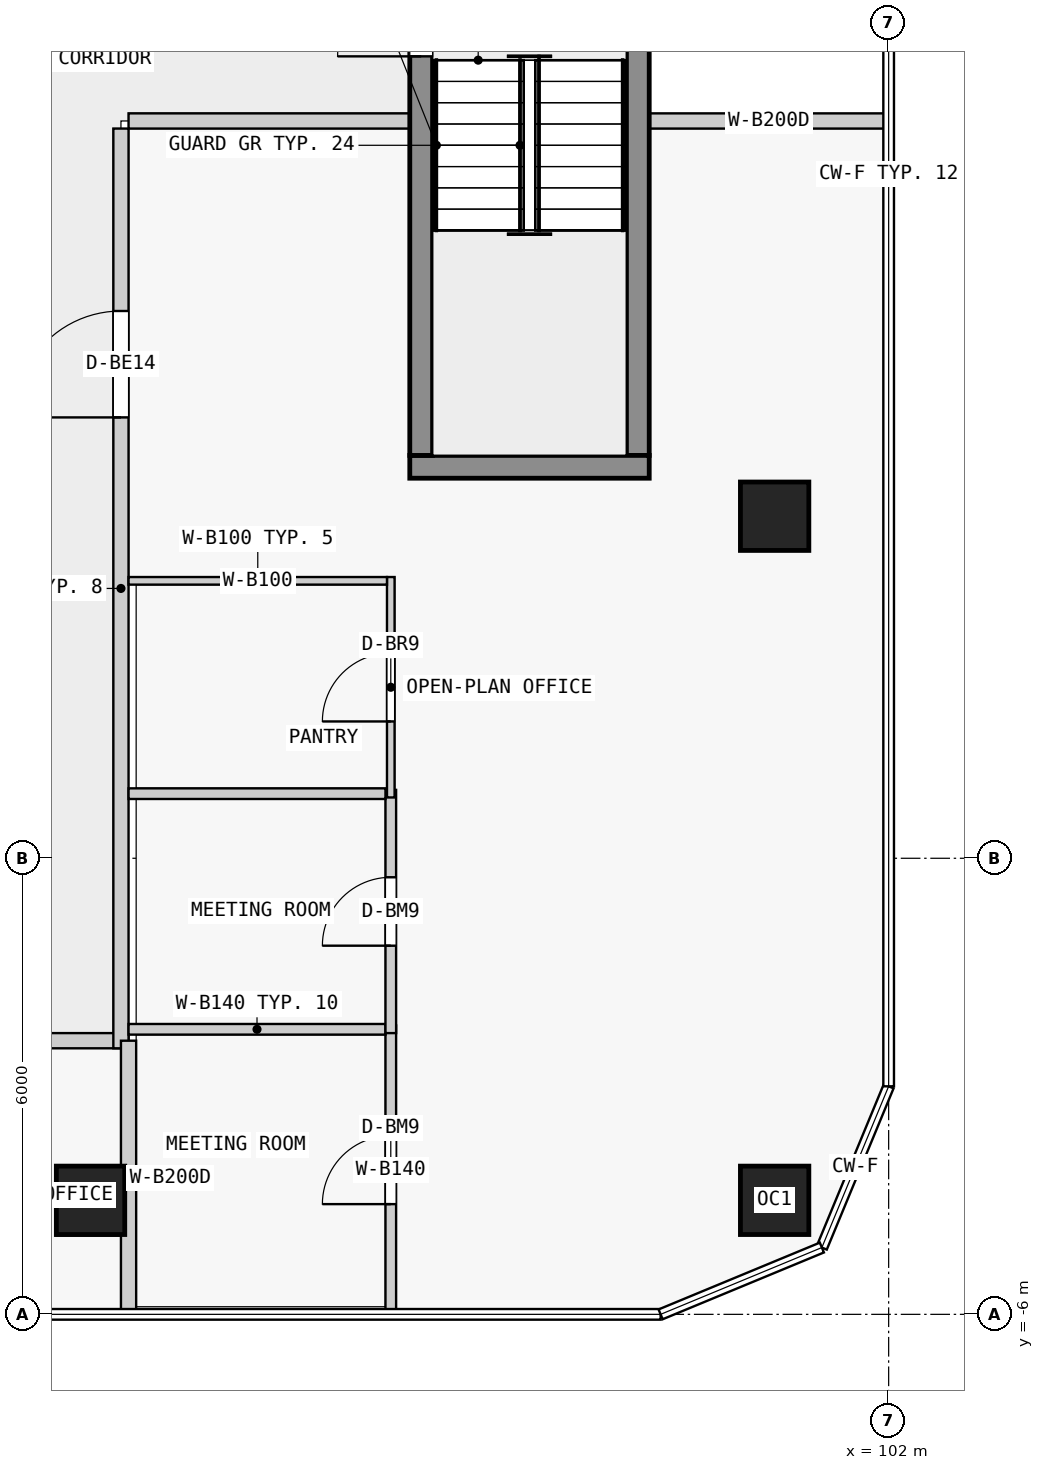
"""IFC4 building model, lengths in metres.
Left out: names, types, materials, properties, quantities, classifications, styles, units other than length and angle.
Written with IfcOpenShell. Run it as: python <this file> out.ifc"""

import sys

from ifc_helpers import new_model, si_unit, direction, frame, frame_2d, origin, origin_2d, place, context, subcontext, project, spatial, rectangle, extrude, element, fill, save


model = new_model("IFC4")
c1 = context("Model", 3, precision=1e-05, world=origin(), true_north=direction((0.0, 1.0)))
c2 = subcontext(c1, "Body", "Model", "MODEL_VIEW")
j1 = project(units=[si_unit("LENGTHUNIT", "METRE"), si_unit("PLANEANGLEUNIT", "RADIAN")], contexts=[c1])
p1 = place(None, origin())
s1 = spatial("IfcSite", under=j1, at=p1, CompositionType="ELEMENT")
p2 = place(p1, origin())
s2 = spatial("IfcBuilding", under=s1, at=p2, CompositionType="ELEMENT")
p3 = place(p2, frame((0.0, 0.0, 72.3)))
s3 = spatial("IfcBuildingStorey", under=s2, at=p3, CompositionType="ELEMENT", Elevation=72.3)
for number, where, z_axis, x_axis in (
    (1, (91.5, -4.5, 0.0), (0.0, 0.0, 1.0), (1.0, 0.0, 0.0)),
    (2, (100.5, -4.5, 0.0), (0.0, 0.0, 1.0), (1.0, 0.0, 0.0)),
    (3, (100.5, 4.5, 0.0), (0.0, 0.0, 1.0), (1.0, 0.0, 0.0)),
):
    element("IfcColumn", number, at=place(p3, frame(where, z_axis=z_axis, x_axis=x_axis)), inside=s3, PredefinedType="COLUMN", context=c2, shape_type="SweptSolid", body=[
        extrude(rectangle(XDim=0.9, YDim=0.9, at=origin_2d()), origin(), (0.0, 0.0, 1.0), 6.0),
    ])
p4 = place(p3, frame((95.85, 5.3, 0.0), z_axis=(0.0, 0.0, 1.0), x_axis=(0.0, 1.0, 0.0)))
e4 = element("IfcWall", 4, at=p4, inside=s3, PredefinedType="SHEAR", context=c2, shape_type="SweptSolid", body=[
    extrude(rectangle(XDim=6.4, YDim=0.3, at=frame_2d((3.2, 0.0))), origin(), (0.0, 0.0, 1.0), 5.75),
])
p5 = place(p4, frame((5.25, 0.0, 0.0)))
e5 = element("IfcOpeningElement", 5, at=p5, cuts=e4, PredefinedType="OPENING", context=c2, shape_type="SweptSolid", body=[
    extrude(rectangle(XDim=1.1, YDim=2.1, at=frame_2d((0.55, 1.05))), frame((0.0, 0.16, 0.0), z_axis=(0.0, -1.0, 0.0), x_axis=(1.0, 0.0, 0.0)), (0.0, 0.0, 1.0), 0.32),
])
p6 = place(p3, frame((98.7, 5.3, 0.0), z_axis=(0.0, 0.0, 1.0), x_axis=(0.0, 1.0, 0.0)))
e6 = element("IfcWall", 6, at=p6, inside=s3, PredefinedType="SHEAR", context=c2, shape_type="SweptSolid", body=[
    extrude(rectangle(XDim=6.4, YDim=0.3, at=frame_2d((3.2, 0.0))), origin(), (0.0, 0.0, 1.0), 5.75),
])
p7 = place(p3, frame((95.7, 5.15, 0.0), z_axis=(0.0, 0.0, 1.0), x_axis=(1.0, 0.0, 0.0)))
e7 = element("IfcWall", 7, at=p7, inside=s3, PredefinedType="SHEAR", context=c2, shape_type="SweptSolid", body=[
    extrude(rectangle(XDim=3.15, YDim=0.3, at=frame_2d((1.575, 0.0))), origin(), (0.0, 0.0, 1.0), 5.75),
])
p8 = place(p3, frame((72.0, -2.4, 0.0), z_axis=(0.0, 0.0, 1.0), x_axis=(1.0, 0.0, 0.0)))
e8 = element("IfcWall", 8, at=p8, inside=s3, PredefinedType="PARTITIONING", context=c2, shape_type="SweptSolid", body=[
    extrude(rectangle(XDim=20.0, YDim=0.2, at=frame_2d((10.0, 0.0))), origin(), (0.0, 0.0, 1.0), 5.75),
])
p9 = place(p8, frame((11.5, 0.0, 0.0)))
e9 = element("IfcOpeningElement", 9, at=p9, cuts=e8, PredefinedType="OPENING", context=c2, shape_type="SweptSolid", body=[
    extrude(rectangle(XDim=1.0, YDim=2.4, at=frame_2d((0.5, 1.2))), frame((0.0, 0.11, 0.0), z_axis=(0.0, -1.0, 0.0), x_axis=(1.0, 0.0, 0.0)), (0.0, 0.0, 1.0), 0.22),
])
p10 = place(p3, frame((91.9, -2.5, 0.0), z_axis=(0.0, 0.0, 1.0), x_axis=(0.0, 1.0, 0.0)))
e10 = element("IfcWall", 10, at=p10, inside=s3, PredefinedType="PARTITIONING", context=c2, shape_type="SweptSolid", body=[
    extrude(rectangle(XDim=12.1, YDim=0.2, at=frame_2d((6.05, 0.0))), origin(), (0.0, 0.0, 1.0), 5.75),
])
p11 = place(p10, frame((8.3, 0.0, 0.0)))
e11 = element("IfcOpeningElement", 11, at=p11, cuts=e10, PredefinedType="OPENING", context=c2, shape_type="SweptSolid", body=[
    extrude(rectangle(XDim=1.4, YDim=2.4, at=frame_2d((0.7, 1.2))), frame((0.0, 0.11, 0.0), z_axis=(0.0, -1.0, 0.0), x_axis=(1.0, 0.0, 0.0)), (0.0, 0.0, 1.0), 0.22),
])
p12 = place(p3, frame((92.0, 9.7, 0.0), z_axis=(0.0, 0.0, 1.0), x_axis=(1.0, 0.0, 0.0)))
e12 = element("IfcWall", 12, at=p12, inside=s3, PredefinedType="PARTITIONING", context=c2, shape_type="SweptSolid", body=[
    extrude(rectangle(XDim=3.7, YDim=0.2, at=frame_2d((1.85, 0.0))), origin(), (0.0, 0.0, 1.0), 5.75),
])
p13 = place(p3, frame((98.85, 9.7, 0.0), z_axis=(0.0, 0.0, 1.0), x_axis=(1.0, 0.0, 0.0)))
e13 = element("IfcWall", 13, at=p13, inside=s3, PredefinedType="PARTITIONING", context=c2, shape_type="SweptSolid", body=[
    extrude(rectangle(XDim=3.15, YDim=0.2, at=frame_2d((1.575, 0.0))), origin(), (0.0, 0.0, 1.0), 5.75),
])
p14 = place(p3, frame((92.0, -6.0, 0.0), z_axis=(0.0, 0.0, 1.0), x_axis=(0.0, 1.0, 0.0)))
e14 = element("IfcWall", 14, at=p14, inside=s3, PredefinedType="PARTITIONING", context=c2, shape_type="SweptSolid", body=[
    extrude(rectangle(XDim=3.6, YDim=0.2, at=frame_2d((1.8, 0.0))), origin(), (0.0, 0.0, 1.0), 5.75),
])
p15 = place(p3, frame((95.45, -6.0, 0.0), z_axis=(0.0, 0.0, 1.0), x_axis=(0.0, 1.0, 0.0)))
e15 = element("IfcWall", 15, at=p15, inside=s3, PredefinedType="PARTITIONING", context=c2, shape_type="SweptSolid", body=[
    extrude(rectangle(XDim=3.8, YDim=0.14, at=frame_2d((1.9, 0.0))), origin(), (0.0, 0.0, 1.0), 5.75),
])
p16 = place(p15, frame((1.45, 0.0, 0.0)))
e16 = element("IfcOpeningElement", 16, at=p16, cuts=e15, PredefinedType="OPENING", context=c2, shape_type="SweptSolid", body=[
    extrude(rectangle(XDim=0.9, YDim=2.4, at=frame_2d((0.45, 1.2))), frame((0.0, 0.08, 0.0), z_axis=(0.0, -1.0, 0.0), x_axis=(1.0, 0.0, 0.0)), (0.0, 0.0, 1.0), 0.16),
])
p17 = place(p3, frame((92.0, -2.25, 0.0), z_axis=(0.0, 0.0, 1.0), x_axis=(1.0, 0.0, 0.0)))
e17 = element("IfcWall", 17, at=p17, inside=s3, PredefinedType="PARTITIONING", context=c2, shape_type="SweptSolid", body=[
    extrude(rectangle(XDim=3.38, YDim=0.14, at=frame_2d((1.69, 0.0))), origin(), (0.0, 0.0, 1.0), 5.75),
])
p18 = place(p3, frame((95.45, -2.3, 0.0), z_axis=(0.0, 0.0, 1.0), x_axis=(0.0, 1.0, 0.0)))
e18 = element("IfcWall", 18, at=p18, inside=s3, PredefinedType="PARTITIONING", context=c2, shape_type="SweptSolid", body=[
    extrude(rectangle(XDim=3.2, YDim=0.14, at=frame_2d((1.6, 0.0))), origin(), (0.0, 0.0, 1.0), 5.75),
])
p19 = place(p18, frame((1.15, 0.0, 0.0)))
e19 = element("IfcOpeningElement", 19, at=p19, cuts=e18, PredefinedType="OPENING", context=c2, shape_type="SweptSolid", body=[
    extrude(rectangle(XDim=0.9, YDim=2.4, at=frame_2d((0.45, 1.2))), frame((0.0, 0.08, 0.0), z_axis=(0.0, -1.0, 0.0), x_axis=(1.0, 0.0, 0.0)), (0.0, 0.0, 1.0), 0.16),
])
p20 = place(p3, frame((92.0, 0.85, 0.0), z_axis=(0.0, 0.0, 1.0), x_axis=(1.0, 0.0, 0.0)))
e20 = element("IfcWall", 20, at=p20, inside=s3, PredefinedType="PARTITIONING", context=c2, shape_type="SweptSolid", body=[
    extrude(rectangle(XDim=3.38, YDim=0.14, at=frame_2d((1.69, 0.0))), origin(), (0.0, 0.0, 1.0), 5.75),
])
p21 = place(p3, frame((95.45, 0.8, 0.0), z_axis=(0.0, 0.0, 1.0), x_axis=(0.0, 1.0, 0.0)))
e21 = element("IfcWall", 21, at=p21, inside=s3, PredefinedType="PARTITIONING", context=c2, shape_type="SweptSolid", body=[
    extrude(rectangle(XDim=2.9, YDim=0.1, at=frame_2d((1.45, 0.0))), origin(), (0.0, 0.0, 1.0), 5.75),
])
p22 = place(p21, frame((1.0, 0.0, 0.0)))
e22 = element("IfcOpeningElement", 22, at=p22, cuts=e21, PredefinedType="OPENING", context=c2, shape_type="SweptSolid", body=[
    extrude(rectangle(XDim=0.9, YDim=2.1, at=frame_2d((0.45, 1.05))), frame((0.0, 0.06, 0.0), z_axis=(0.0, -1.0, 0.0), x_axis=(1.0, 0.0, 0.0)), (0.0, 0.0, 1.0), 0.12),
])
p23 = place(p3, frame((92.0, 3.65, 0.0), z_axis=(0.0, 0.0, 1.0), x_axis=(1.0, 0.0, 0.0)))
e23 = element("IfcWall", 23, at=p23, inside=s3, PredefinedType="PARTITIONING", context=c2, shape_type="SweptSolid", body=[
    extrude(rectangle(XDim=3.4, YDim=0.1, at=frame_2d((1.7, 0.0))), origin(), (0.0, 0.0, 1.0), 5.75),
])
p24 = place(p5, origin())
e24 = element("IfcDoor", 24, at=p24, inside=s3, OperationType="SINGLE_SWING_LEFT", PredefinedType="DOOR", context=c2, shape_type="SweptSolid", body=[
    extrude(rectangle(XDim=1.1, YDim=2.1, at=frame_2d((0.55, 1.05))), frame((0.0, 0.025, 0.0), z_axis=(0.0, -1.0, 0.0), x_axis=(1.0, 0.0, 0.0)), (0.0, 0.0, 1.0), 0.05),
])
fill(e5, e24)
p25 = place(p11, origin())
e25 = element("IfcDoor", 25, at=p25, inside=s3, OperationType="DOUBLE_DOOR_SINGLE_SWING", PredefinedType="DOOR", context=c2, shape_type="SweptSolid", body=[
    extrude(rectangle(XDim=1.4, YDim=2.4, at=frame_2d((0.7, 1.2))), frame((0.0, 0.025, 0.0), z_axis=(0.0, -1.0, 0.0), x_axis=(1.0, 0.0, 0.0)), (0.0, 0.0, 1.0), 0.05),
])
fill(e11, e25)
p26 = place(p16, origin())
e26 = element("IfcDoor", 26, at=p26, inside=s3, OperationType="SINGLE_SWING_LEFT", PredefinedType="DOOR", context=c2, shape_type="SweptSolid", body=[
    extrude(rectangle(XDim=0.9, YDim=2.4, at=frame_2d((0.45, 1.2))), frame((0.0, 0.025, 0.0), z_axis=(0.0, -1.0, 0.0), x_axis=(1.0, 0.0, 0.0)), (0.0, 0.0, 1.0), 0.05),
])
fill(e16, e26)
p27 = place(p19, origin())
e27 = element("IfcDoor", 27, at=p27, inside=s3, OperationType="SINGLE_SWING_LEFT", PredefinedType="DOOR", context=c2, shape_type="SweptSolid", body=[
    extrude(rectangle(XDim=0.9, YDim=2.4, at=frame_2d((0.45, 1.2))), frame((0.0, 0.025, 0.0), z_axis=(0.0, -1.0, 0.0), x_axis=(1.0, 0.0, 0.0)), (0.0, 0.0, 1.0), 0.05),
])
fill(e19, e27)
p28 = place(p22, origin())
e28 = element("IfcDoor", 28, at=p28, inside=s3, OperationType="SINGLE_SWING_LEFT", PredefinedType="DOOR", context=c2, shape_type="SweptSolid", body=[
    extrude(rectangle(XDim=0.9, YDim=2.1, at=frame_2d((0.45, 1.05))), frame((0.0, 0.025, 0.0), z_axis=(0.0, -1.0, 0.0), x_axis=(1.0, 0.0, 0.0)), (0.0, 0.0, 1.0), 0.05),
])
fill(e22, e28)
save(model, sys.argv[1])
